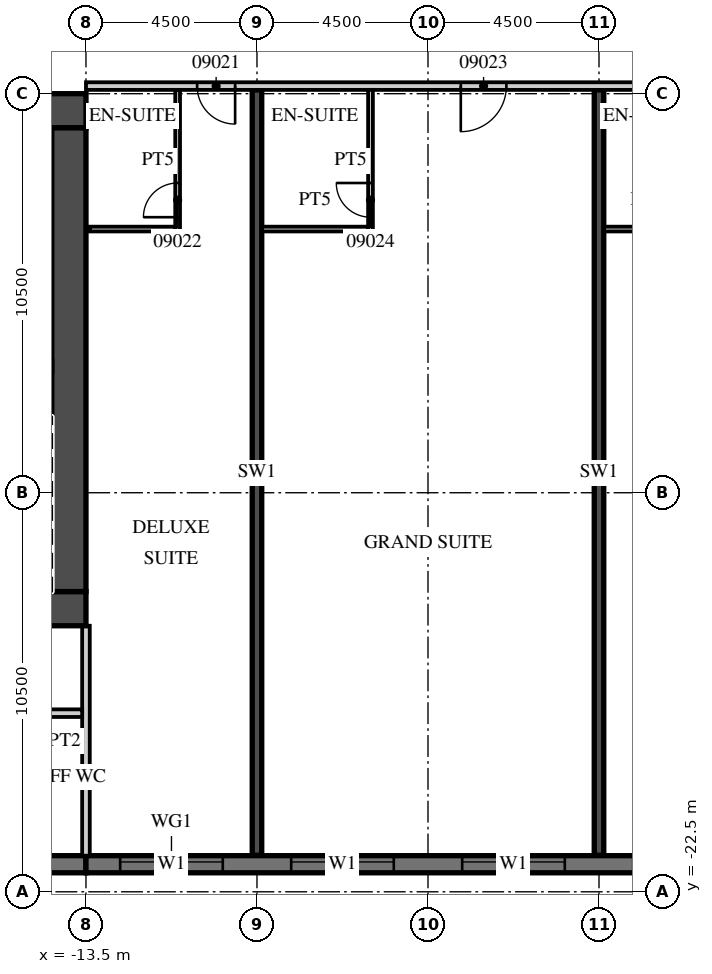
"""IFC4 building model, lengths in metres.
Left out: names, types, materials, properties, quantities, classifications, styles, units other than length and angle.
Written with IfcOpenShell. Run it as: python <this file> out.ifc"""

import sys

from ifc_helpers import new_model, si_unit, direction, frame, frame_2d, origin, place, context, subcontext, project, spatial, rectangle, extrude, element, fill, save


model = new_model("IFC4")
c1 = context("Model", 3, precision=1e-05, world=origin(), true_north=direction((0.0, 1.0)))
c2 = subcontext(c1, "Body", "Model", "MODEL_VIEW")
j1 = project(units=[si_unit("LENGTHUNIT", "METRE"), si_unit("PLANEANGLEUNIT", "RADIAN")], contexts=[c1])
p1 = place(None, origin())
s1 = spatial("IfcSite", under=j1, at=p1, CompositionType="ELEMENT")
p2 = place(p1, origin())
s2 = spatial("IfcBuilding", under=s1, at=p2, CompositionType="ELEMENT")
p3 = place(p2, frame((0.0, 0.0, 60.0)))
s3 = spatial("IfcBuildingStorey", under=s2, at=p3, CompositionType="ELEMENT", Elevation=60.0)
for number, where, z_axis, x_axis in (
    (1, (-9.0, -21.54, 0.0), (0.0, 0.0, 1.0), (0.0, 1.0, 0.0)),
    (2, (0.0, -21.54, 0.0), (0.0, 0.0, 1.0), (0.0, 1.0, 0.0)),
):
    element("IfcWall", number, at=place(p3, frame(where, z_axis=z_axis, x_axis=x_axis)), inside=s3, PredefinedType="SHEAR", context=c2, shape_type="SweptSolid", body=[
        extrude(rectangle(XDim=20.14, YDim=0.25, at=frame_2d((10.07, 0.0))), origin(), (0.0, 0.0, 1.0), 3.3),
    ])
p4 = place(p3, frame((-31.5, -21.775, 0.0), z_axis=(0.0, 0.0, 1.0), x_axis=(1.0, 0.0, 0.0)))
e3 = element("IfcWall", 3, at=p4, inside=s3, PredefinedType="SOLIDWALL", context=c2, shape_type="SweptSolid", body=[
    extrude(rectangle(XDim=18.0, YDim=0.45, at=frame_2d((9.0, 0.0))), origin(), (0.0, 0.0, 1.0), 3.02),
])
p5 = place(p3, frame((-13.5, -21.775, 0.0), z_axis=(0.0, 0.0, 1.0), x_axis=(1.0, 0.0, 0.0)))
e4 = element("IfcWall", 4, at=p5, inside=s3, PredefinedType="SOLIDWALL", context=c2, shape_type="SweptSolid", body=[
    extrude(rectangle(XDim=54.5, YDim=0.45, at=frame_2d((27.25, 0.0))), origin(), (0.0, 0.0, 1.0), 3.02),
])
p6 = place(p5, frame((0.9, 0.0, 0.45)))
e5 = element("IfcOpeningElement", 5, at=p6, cuts=e4, PredefinedType="OPENING", context=c2, shape_type="SweptSolid", body=[
    extrude(rectangle(XDim=2.7, YDim=2.25, at=frame_2d((1.35, 1.125))), frame((0.0, 0.235, 0.0), z_axis=(0.0, -1.0, 0.0), x_axis=(1.0, 0.0, 0.0)), (0.0, 0.0, 1.0), 0.47),
])
p7 = place(p5, frame((5.4, 0.0, 0.45)))
e6 = element("IfcOpeningElement", 6, at=p7, cuts=e4, PredefinedType="OPENING", context=c2, shape_type="SweptSolid", body=[
    extrude(rectangle(XDim=2.7, YDim=2.25, at=frame_2d((1.35, 1.125))), frame((0.0, 0.235, 0.0), z_axis=(0.0, -1.0, 0.0), x_axis=(1.0, 0.0, 0.0)), (0.0, 0.0, 1.0), 0.47),
])
p8 = place(p5, frame((9.9, 0.0, 0.45)))
e7 = element("IfcOpeningElement", 7, at=p8, cuts=e4, PredefinedType="OPENING", context=c2, shape_type="SweptSolid", body=[
    extrude(rectangle(XDim=2.7, YDim=2.25, at=frame_2d((1.35, 1.125))), frame((0.0, 0.235, 0.0), z_axis=(0.0, -1.0, 0.0), x_axis=(1.0, 0.0, 0.0)), (0.0, 0.0, 1.0), 0.47),
])
p9 = place(p5, frame((14.4, 0.0, 0.45)))
e8 = element("IfcOpeningElement", 8, at=p9, cuts=e4, PredefinedType="OPENING", context=c2, shape_type="SweptSolid", body=[
    extrude(rectangle(XDim=2.7, YDim=2.25, at=frame_2d((1.35, 1.125))), frame((0.0, 0.235, 0.0), z_axis=(0.0, -1.0, 0.0), x_axis=(1.0, 0.0, 0.0)), (0.0, 0.0, 1.0), 0.47),
])
p10 = place(p5, frame((18.9, 0.0, 0.45)))
e9 = element("IfcOpeningElement", 9, at=p10, cuts=e4, PredefinedType="OPENING", context=c2, shape_type="SweptSolid", body=[
    extrude(rectangle(XDim=2.7, YDim=2.25, at=frame_2d((1.35, 1.125))), frame((0.0, 0.235, 0.0), z_axis=(0.0, -1.0, 0.0), x_axis=(1.0, 0.0, 0.0)), (0.0, 0.0, 1.0), 0.47),
])
p11 = place(p5, frame((23.4, 0.0, 0.45)))
e10 = element("IfcOpeningElement", 10, at=p11, cuts=e4, PredefinedType="OPENING", context=c2, shape_type="SweptSolid", body=[
    extrude(rectangle(XDim=2.7, YDim=2.25, at=frame_2d((1.35, 1.125))), frame((0.0, 0.235, 0.0), z_axis=(0.0, -1.0, 0.0), x_axis=(1.0, 0.0, 0.0)), (0.0, 0.0, 1.0), 0.47),
])
p12 = place(p5, frame((27.9, 0.0, 0.45)))
e11 = element("IfcOpeningElement", 11, at=p12, cuts=e4, PredefinedType="OPENING", context=c2, shape_type="SweptSolid", body=[
    extrude(rectangle(XDim=2.7, YDim=2.25, at=frame_2d((1.35, 1.125))), frame((0.0, 0.235, 0.0), z_axis=(0.0, -1.0, 0.0), x_axis=(1.0, 0.0, 0.0)), (0.0, 0.0, 1.0), 0.47),
])
p13 = place(p5, frame((32.4, 0.0, 0.45)))
e12 = element("IfcOpeningElement", 12, at=p13, cuts=e4, PredefinedType="OPENING", context=c2, shape_type="SweptSolid", body=[
    extrude(rectangle(XDim=2.7, YDim=2.25, at=frame_2d((1.35, 1.125))), frame((0.0, 0.235, 0.0), z_axis=(0.0, -1.0, 0.0), x_axis=(1.0, 0.0, 0.0)), (0.0, 0.0, 1.0), 0.47),
])
p14 = place(p5, frame((36.9, 0.0, 0.45)))
e13 = element("IfcOpeningElement", 13, at=p14, cuts=e4, PredefinedType="OPENING", context=c2, shape_type="SweptSolid", body=[
    extrude(rectangle(XDim=2.7, YDim=2.25, at=frame_2d((1.35, 1.125))), frame((0.0, 0.235, 0.0), z_axis=(0.0, -1.0, 0.0), x_axis=(1.0, 0.0, 0.0)), (0.0, 0.0, 1.0), 0.47),
])
p15 = place(p5, frame((41.4, 0.0, 0.45)))
e14 = element("IfcOpeningElement", 14, at=p15, cuts=e4, PredefinedType="OPENING", context=c2, shape_type="SweptSolid", body=[
    extrude(rectangle(XDim=2.7, YDim=2.25, at=frame_2d((1.35, 1.125))), frame((0.0, 0.235, 0.0), z_axis=(0.0, -1.0, 0.0), x_axis=(1.0, 0.0, 0.0)), (0.0, 0.0, 1.0), 0.47),
])
p16 = place(p5, frame((45.9, 0.0, 0.45)))
e15 = element("IfcOpeningElement", 15, at=p16, cuts=e4, PredefinedType="OPENING", context=c2, shape_type="SweptSolid", body=[
    extrude(rectangle(XDim=2.7, YDim=2.25, at=frame_2d((1.35, 1.125))), frame((0.0, 0.235, 0.0), z_axis=(0.0, -1.0, 0.0), x_axis=(1.0, 0.0, 0.0)), (0.0, 0.0, 1.0), 0.47),
])
p17 = place(p5, frame((50.4, 0.0, 0.45)))
e16 = element("IfcOpeningElement", 16, at=p17, cuts=e4, PredefinedType="OPENING", context=c2, shape_type="SweptSolid", body=[
    extrude(rectangle(XDim=2.7, YDim=2.25, at=frame_2d((1.35, 1.125))), frame((0.0, 0.235, 0.0), z_axis=(0.0, -1.0, 0.0), x_axis=(1.0, 0.0, 0.0)), (0.0, 0.0, 1.0), 0.47),
])
p18 = place(p3, frame((-13.5, -21.55, 0.0), z_axis=(0.0, 0.0, 1.0), x_axis=(0.0, 1.0, 0.0)))
e17 = element("IfcWall", 17, at=p18, inside=s3, PredefinedType="PARTITIONING", context=c2, shape_type="SweptSolid", body=[
    extrude(rectangle(XDim=6.05, YDim=0.2, at=frame_2d((3.025, 0.0))), origin(), (0.0, 0.0, 1.0), 3.02),
])
p19 = place(p3, frame((-13.5, -1.3, 0.0), z_axis=(0.0, 0.0, 1.0), x_axis=(1.0, 0.0, 0.0)))
e18 = element("IfcWall", 18, at=p19, inside=s3, PredefinedType="PARTITIONING", context=c2, shape_type="SweptSolid", body=[
    extrude(rectangle(XDim=58.05, YDim=0.2, at=frame_2d((29.025, 0.0))), origin(), (0.0, 0.0, 1.0), 3.02),
])
p20 = place(p19, frame((2.925, 0.0, 0.0)))
e19 = element("IfcOpeningElement", 19, at=p20, cuts=e18, PredefinedType="OPENING", context=c2, shape_type="SweptSolid", body=[
    extrude(rectangle(XDim=1.0, YDim=2.1, at=frame_2d((0.5, 1.05))), frame((0.0, 0.11, 0.0), z_axis=(0.0, -1.0, 0.0), x_axis=(1.0, 0.0, 0.0)), (0.0, 0.0, 1.0), 0.22),
])
p21 = place(p19, frame((9.863, 0.0, 0.0)))
e20 = element("IfcOpeningElement", 20, at=p21, cuts=e18, PredefinedType="OPENING", context=c2, shape_type="SweptSolid", body=[
    extrude(rectangle(XDim=1.2, YDim=2.1, at=frame_2d((0.6, 1.05))), frame((0.0, 0.11, 0.0), z_axis=(0.0, -1.0, 0.0), x_axis=(1.0, 0.0, 0.0)), (0.0, 0.0, 1.0), 0.22),
])
p22 = place(p19, frame((16.45, 0.0, 0.0)))
e21 = element("IfcOpeningElement", 21, at=p22, cuts=e18, PredefinedType="OPENING", context=c2, shape_type="SweptSolid", body=[
    extrude(rectangle(XDim=1.0, YDim=2.1, at=frame_2d((0.5, 1.05))), frame((0.0, 0.11, 0.0), z_axis=(0.0, -1.0, 0.0), x_axis=(1.0, 0.0, 0.0)), (0.0, 0.0, 1.0), 0.22),
])
p23 = place(p19, frame((18.55, 0.0, 0.0)))
e22 = element("IfcOpeningElement", 22, at=p23, cuts=e18, PredefinedType="OPENING", context=c2, shape_type="SweptSolid", body=[
    extrude(rectangle(XDim=1.0, YDim=2.1, at=frame_2d((0.5, 1.05))), frame((0.0, 0.11, 0.0), z_axis=(0.0, -1.0, 0.0), x_axis=(1.0, 0.0, 0.0)), (0.0, 0.0, 1.0), 0.22),
])
p24 = place(p19, frame((24.938, 0.0, 0.0)))
e23 = element("IfcOpeningElement", 23, at=p24, cuts=e18, PredefinedType="OPENING", context=c2, shape_type="SweptSolid", body=[
    extrude(rectangle(XDim=1.2, YDim=2.1, at=frame_2d((0.6, 1.05))), frame((0.0, 0.11, 0.0), z_axis=(0.0, -1.0, 0.0), x_axis=(1.0, 0.0, 0.0)), (0.0, 0.0, 1.0), 0.22),
])
p25 = place(p19, frame((33.938, 0.0, 0.0)))
e24 = element("IfcOpeningElement", 24, at=p25, cuts=e18, PredefinedType="OPENING", context=c2, shape_type="SweptSolid", body=[
    extrude(rectangle(XDim=1.2, YDim=2.1, at=frame_2d((0.6, 1.05))), frame((0.0, 0.11, 0.0), z_axis=(0.0, -1.0, 0.0), x_axis=(1.0, 0.0, 0.0)), (0.0, 0.0, 1.0), 0.22),
])
p26 = place(p19, frame((42.938, 0.0, 0.0)))
e25 = element("IfcOpeningElement", 25, at=p26, cuts=e18, PredefinedType="OPENING", context=c2, shape_type="SweptSolid", body=[
    extrude(rectangle(XDim=1.2, YDim=2.1, at=frame_2d((0.6, 1.05))), frame((0.0, 0.11, 0.0), z_axis=(0.0, -1.0, 0.0), x_axis=(1.0, 0.0, 0.0)), (0.0, 0.0, 1.0), 0.22),
])
p27 = place(p19, frame((52.425, 0.0, 0.0)))
e26 = element("IfcOpeningElement", 26, at=p27, cuts=e18, PredefinedType="OPENING", context=c2, shape_type="SweptSolid", body=[
    extrude(rectangle(XDim=1.0, YDim=2.1, at=frame_2d((0.5, 1.05))), frame((0.0, 0.11, 0.0), z_axis=(0.0, -1.0, 0.0), x_axis=(1.0, 0.0, 0.0)), (0.0, 0.0, 1.0), 0.22),
])
p28 = place(p19, frame((56.525, 0.0, 0.0)))
e27 = element("IfcOpeningElement", 27, at=p28, cuts=e18, PredefinedType="OPENING", context=c2, shape_type="SweptSolid", body=[
    extrude(rectangle(XDim=1.0, YDim=2.1, at=frame_2d((0.5, 1.05))), frame((0.0, 0.11, 0.0), z_axis=(0.0, -1.0, 0.0), x_axis=(1.0, 0.0, 0.0)), (0.0, 0.0, 1.0), 0.22),
])
p29 = place(p3, frame((-11.088, -5.125, 0.0), z_axis=(0.0, 0.0, 1.0), x_axis=(0.0, 1.0, 0.0)))
e28 = element("IfcWall", 28, at=p29, inside=s3, PredefinedType="PARTITIONING", context=c2, shape_type="SweptSolid", body=[
    extrude(rectangle(XDim=3.725, YDim=0.125, at=frame_2d((1.863, 0.0))), origin(), (0.0, 0.0, 1.0), 3.02),
])
p30 = place(p29, frame((0.375, 0.0, 0.0)))
e29 = element("IfcOpeningElement", 29, at=p30, cuts=e28, PredefinedType="OPENING", context=c2, shape_type="SweptSolid", body=[
    extrude(rectangle(XDim=0.9, YDim=2.1, at=frame_2d((0.45, 1.05))), frame((0.0, 0.073, 0.0), z_axis=(0.0, -1.0, 0.0), x_axis=(1.0, 0.0, 0.0)), (0.0, 0.0, 1.0), 0.145),
])
p31 = place(p3, frame((-13.4, -5.062, 0.0), z_axis=(0.0, 0.0, 1.0), x_axis=(1.0, 0.0, 0.0)))
e30 = element("IfcWall", 30, at=p31, inside=s3, PredefinedType="PARTITIONING", context=c2, shape_type="SweptSolid", body=[
    extrude(rectangle(XDim=2.25, YDim=0.125, at=frame_2d((1.125, 0.0))), origin(), (0.0, 0.0, 1.0), 3.02),
])
p32 = place(p3, frame((-6.013, -5.125, 0.0), z_axis=(0.0, 0.0, 1.0), x_axis=(0.0, 1.0, 0.0)))
e31 = element("IfcWall", 31, at=p32, inside=s3, PredefinedType="PARTITIONING", context=c2, shape_type="SweptSolid", body=[
    extrude(rectangle(XDim=3.725, YDim=0.125, at=frame_2d((1.863, 0.0))), origin(), (0.0, 0.0, 1.0), 3.02),
])
p33 = place(p32, frame((0.375, 0.0, 0.0)))
e32 = element("IfcOpeningElement", 32, at=p33, cuts=e31, PredefinedType="OPENING", context=c2, shape_type="SweptSolid", body=[
    extrude(rectangle(XDim=0.9, YDim=2.1, at=frame_2d((0.45, 1.05))), frame((0.0, 0.073, 0.0), z_axis=(0.0, -1.0, 0.0), x_axis=(1.0, 0.0, 0.0)), (0.0, 0.0, 1.0), 0.145),
])
p34 = place(p3, frame((-8.875, -5.062, 0.0), z_axis=(0.0, 0.0, 1.0), x_axis=(1.0, 0.0, 0.0)))
e33 = element("IfcWall", 33, at=p34, inside=s3, PredefinedType="PARTITIONING", context=c2, shape_type="SweptSolid", body=[
    extrude(rectangle(XDim=2.8, YDim=0.125, at=frame_2d((1.4, 0.0))), origin(), (0.0, 0.0, 1.0), 3.02),
])
p35 = place(p3, frame((0.125, -5.062, 0.0), z_axis=(0.0, 0.0, 1.0), x_axis=(1.0, 0.0, 0.0)))
e34 = element("IfcWall", 34, at=p35, inside=s3, PredefinedType="PARTITIONING", context=c2, shape_type="SweptSolid", body=[
    extrude(rectangle(XDim=2.25, YDim=0.125, at=frame_2d((1.125, 0.0))), origin(), (0.0, 0.0, 1.0), 3.02),
])
p36 = place(p3, frame((-31.5, -1.95, 0.0), z_axis=(0.0, 0.0, 1.0), x_axis=(1.0, 0.0, 0.0)))
e35 = element("IfcWall", 35, at=p36, inside=s3, PredefinedType="SHEAR", context=c2, shape_type="SweptSolid", body=[
    extrude(rectangle(XDim=18.0, YDim=0.9, at=frame_2d((9.0, 0.0))), origin(), (0.0, 0.0, 1.0), 3.02),
])
p37 = place(p36, frame((14.725, 0.0, 0.0)))
e36 = element("IfcOpeningElement", 36, at=p37, cuts=e35, PredefinedType="OPENING", context=c2, shape_type="SweptSolid", body=[
    extrude(rectangle(XDim=1.8, YDim=2.1, at=frame_2d((0.9, 1.05))), frame((0.0, 0.46, 0.0), z_axis=(0.0, -1.0, 0.0), x_axis=(1.0, 0.0, 0.0)), (0.0, 0.0, 1.0), 0.92),
])
p38 = place(p3, frame((-20.3, -15.05, 0.0), z_axis=(0.0, 0.0, 1.0), x_axis=(1.0, 0.0, 0.0)))
e37 = element("IfcWall", 37, at=p38, inside=s3, PredefinedType="SHEAR", context=c2, shape_type="SweptSolid", body=[
    extrude(rectangle(XDim=6.8, YDim=0.9, at=frame_2d((3.4, 0.0))), origin(), (0.0, 0.0, 1.0), 3.02),
])
p39 = place(p38, frame((0.875, 0.0, 0.0)))
e38 = element("IfcOpeningElement", 38, at=p39, cuts=e37, PredefinedType="OPENING", context=c2, shape_type="SweptSolid", body=[
    extrude(rectangle(XDim=1.2, YDim=2.1, at=frame_2d((0.6, 1.05))), frame((0.0, 0.46, 0.0), z_axis=(0.0, -1.0, 0.0), x_axis=(1.0, 0.0, 0.0)), (0.0, 0.0, 1.0), 0.92),
])
p40 = place(p3, frame((-13.95, -14.6, 0.0), z_axis=(0.0, 0.0, 1.0), x_axis=(0.0, 1.0, 0.0)))
e39 = element("IfcWall", 39, at=p40, inside=s3, PredefinedType="SHEAR", context=c2, shape_type="SweptSolid", body=[
    extrude(rectangle(XDim=12.2, YDim=0.9, at=frame_2d((6.1, 0.0))), origin(), (0.0, 0.0, 1.0), 3.02),
])
p41 = place(p3, frame((-44.55, -17.8, 0.0), z_axis=(0.0, 0.0, 1.0), x_axis=(1.0, 0.0, 0.0)))
e40 = element("IfcWall", 40, at=p41, inside=s3, PredefinedType="PARTITIONING", context=c2, shape_type="SweptSolid", body=[
    extrude(rectangle(XDim=30.95, YDim=0.2, at=frame_2d((15.475, 0.0))), origin(), (0.0, 0.0, 1.0), 3.02),
])
p42 = place(p41, frame((15.038, 0.0, 0.0)))
e41 = element("IfcOpeningElement", 41, at=p42, cuts=e40, PredefinedType="OPENING", context=c2, shape_type="SweptSolid", body=[
    extrude(rectangle(XDim=0.9, YDim=2.1, at=frame_2d((0.45, 1.05))), frame((0.0, 0.11, 0.0), z_axis=(0.0, -1.0, 0.0), x_axis=(1.0, 0.0, 0.0)), (0.0, 0.0, 1.0), 0.22),
])
p43 = place(p41, frame((23.337, 0.0, 0.0)))
e42 = element("IfcOpeningElement", 42, at=p43, cuts=e40, PredefinedType="OPENING", context=c2, shape_type="SweptSolid", body=[
    extrude(rectangle(XDim=0.9, YDim=2.1, at=frame_2d((0.45, 1.05))), frame((0.0, 0.11, 0.0), z_axis=(0.0, -1.0, 0.0), x_axis=(1.0, 0.0, 0.0)), (0.0, 0.0, 1.0), 0.22),
])
p44 = place(p6, origin())
e43 = element("IfcWindow", 43, at=p44, inside=s3, PartitioningType="SINGLE_PANEL", PredefinedType="WINDOW", context=c2, shape_type="SweptSolid", body=[
    extrude(rectangle(XDim=2.7, YDim=2.25, at=frame_2d((1.35, 1.125))), frame((0.0, 0.09, 0.0), z_axis=(0.0, -1.0, 0.0), x_axis=(1.0, 0.0, 0.0)), (0.0, 0.0, 1.0), 0.06),
])
fill(e5, e43)
p45 = place(p7, origin())
e44 = element("IfcWindow", 44, at=p45, inside=s3, PartitioningType="SINGLE_PANEL", PredefinedType="WINDOW", context=c2, shape_type="SweptSolid", body=[
    extrude(rectangle(XDim=2.7, YDim=2.25, at=frame_2d((1.35, 1.125))), frame((0.0, 0.09, 0.0), z_axis=(0.0, -1.0, 0.0), x_axis=(1.0, 0.0, 0.0)), (0.0, 0.0, 1.0), 0.06),
])
fill(e6, e44)
p46 = place(p8, origin())
e45 = element("IfcWindow", 45, at=p46, inside=s3, PartitioningType="SINGLE_PANEL", PredefinedType="WINDOW", context=c2, shape_type="SweptSolid", body=[
    extrude(rectangle(XDim=2.7, YDim=2.25, at=frame_2d((1.35, 1.125))), frame((0.0, 0.09, 0.0), z_axis=(0.0, -1.0, 0.0), x_axis=(1.0, 0.0, 0.0)), (0.0, 0.0, 1.0), 0.06),
])
fill(e7, e45)
p47 = place(p20, origin())
e46 = element("IfcDoor", 46, at=p47, inside=s3, OperationType="SINGLE_SWING_RIGHT", PredefinedType="DOOR", context=c2, shape_type="SweptSolid", body=[
    extrude(rectangle(XDim=1.0, YDim=2.1, at=frame_2d((0.5, 1.05))), frame((0.0, 0.025, 0.0), z_axis=(0.0, -1.0, 0.0), x_axis=(1.0, 0.0, 0.0)), (0.0, 0.0, 1.0), 0.05),
])
fill(e19, e46)
p48 = place(p30, origin())
e47 = element("IfcDoor", 47, at=p48, inside=s3, OperationType="SINGLE_SWING_LEFT", PredefinedType="DOOR", context=c2, shape_type="SweptSolid", body=[
    extrude(rectangle(XDim=0.9, YDim=2.1, at=frame_2d((0.45, 1.05))), frame((0.0, 0.025, 0.0), z_axis=(0.0, -1.0, 0.0), x_axis=(1.0, 0.0, 0.0)), (0.0, 0.0, 1.0), 0.05),
])
fill(e29, e47)
p49 = place(p21, origin())
e48 = element("IfcDoor", 48, at=p49, inside=s3, OperationType="SINGLE_SWING_LEFT", PredefinedType="DOOR", context=c2, shape_type="SweptSolid", body=[
    extrude(rectangle(XDim=1.2, YDim=2.1, at=frame_2d((0.6, 1.05))), frame((0.0, 0.025, 0.0), z_axis=(0.0, -1.0, 0.0), x_axis=(1.0, 0.0, 0.0)), (0.0, 0.0, 1.0), 0.05),
])
fill(e20, e48)
p50 = place(p33, origin())
e49 = element("IfcDoor", 49, at=p50, inside=s3, OperationType="SINGLE_SWING_RIGHT", PredefinedType="DOOR", context=c2, shape_type="SweptSolid", body=[
    extrude(rectangle(XDim=0.9, YDim=2.1, at=frame_2d((0.45, 1.05))), frame((0.0, 0.025, 0.0), z_axis=(0.0, -1.0, 0.0), x_axis=(1.0, 0.0, 0.0)), (0.0, 0.0, 1.0), 0.05),
])
fill(e32, e49)
save(model, sys.argv[1])
